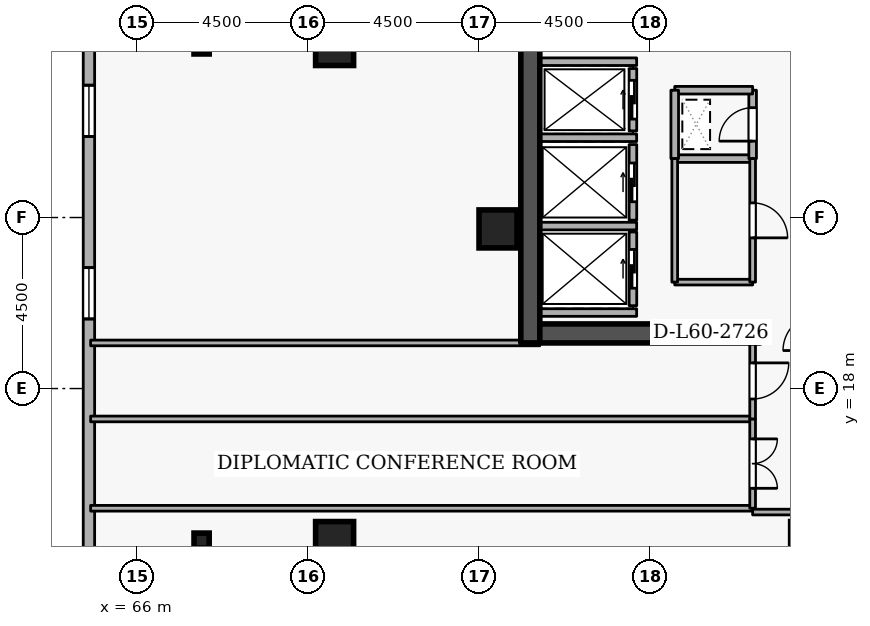
"""IFC4 building model, lengths in metres.
Left out: names, types, materials, properties, quantities, classifications, styles, units other than length and angle.
Written with IfcOpenShell. Run it as: python <this file> out.ifc"""

import sys

from ifc_helpers import new_model, si_unit, direction, frame, frame_2d, origin, origin_2d, place, context, subcontext, project, spatial, rectangle, i_section, extrude, element, fill, save


model = new_model("IFC4")
c1 = context("Model", 3, precision=1e-05, world=origin(), true_north=direction((0.0, 1.0)))
c2 = subcontext(c1, "Body", "Model", "MODEL_VIEW")
j1 = project(units=[si_unit("LENGTHUNIT", "METRE"), si_unit("PLANEANGLEUNIT", "RADIAN")], contexts=[c1])
p1 = place(None, origin())
s1 = spatial("IfcSite", under=j1, at=p1, CompositionType="ELEMENT")
p2 = place(p1, origin())
s2 = spatial("IfcBuilding", under=s1, at=p2, CompositionType="ELEMENT")
p3 = place(p2, frame((0.0, 0.0, 225.9)))
s3 = spatial("IfcBuildingStorey", under=s2, at=p3, CompositionType="ELEMENT", Elevation=225.9)
p4 = place(p3, frame((76.35, 19.2, 0.0), z_axis=(0.0, 0.0, 1.0), x_axis=(0.0, 1.0, 0.0)))
e1 = element("IfcWall", 1, at=p4, inside=s3, PredefinedType="SHEAR", context=c2, shape_type="SweptSolid", body=[
    extrude(rectangle(XDim=15.6, YDim=0.5, at=frame_2d((7.8, 0.0))), origin(), (0.0, 0.0, 1.0), 3.6),
])
p5 = place(p3, frame((76.6, 19.45, 0.0), z_axis=(0.0, 0.0, 1.0), x_axis=(1.0, 0.0, 0.0)))
e2 = element("IfcWall", 2, at=p5, inside=s3, PredefinedType="SHEAR", context=c2, shape_type="SweptSolid", body=[
    extrude(rectangle(XDim=5.8, YDim=0.5, at=frame_2d((2.9, 0.0))), origin(), (0.0, 0.0, 1.0), 3.6),
])
for number, where, z_axis, x_axis in (
    (3, (71.2, 14.0, 0.0), (0.0, 0.0, 1.0), (1.0, 0.0, 0.0)),
    (4, (71.2, 27.0, 0.0), (0.0, 0.0, 1.0), (1.0, 0.0, 0.0)),
    (5, (75.5, 22.2, 0.0), (0.0, 0.0, 1.0), (1.0, 0.0, 0.0)),
):
    element("IfcColumn", number, at=place(p3, frame(where, z_axis=z_axis, x_axis=x_axis)), inside=s3, PredefinedType="COLUMN", context=c2, shape_type="SweptSolid", body=[
        extrude(rectangle(XDim=1.0, YDim=1.0, at=origin_2d()), origin(), (0.0, 0.0, 1.0), 3.6),
    ])
for number, where, z_axis, x_axis in (
    (6, (67.7, 14.0, 0.0), (0.0, 0.0, 1.0), (1.0, 0.0, 0.0)),
    (7, (67.7, 27.0, 0.0), (0.0, 0.0, 1.0), (1.0, 0.0, 0.0)),
):
    element("IfcColumn", number, at=place(p3, frame(where, z_axis=z_axis, x_axis=x_axis)), inside=s3, PredefinedType="COLUMN", context=c2, shape_type="SweptSolid", body=[
        extrude(i_section(OverallWidth=0.399, OverallDepth=0.394, WebThickness=0.023, FlangeThickness=0.037, FilletRadius=0.015, at=origin_2d()), origin(), (0.0, 0.0, 1.0), 3.6),
    ])
p6 = place(p3, frame((64.735, 42.181, 0.0), z_axis=(0.0, 0.0, 1.0), x_axis=(0.0, -1.0, 0.0)))
e8 = element("IfcWall", 8, at=p6, inside=s3, PredefinedType="STANDARD", context=c2, shape_type="SweptSolid", body=[
    extrude(rectangle(XDim=36.363, YDim=0.3, at=frame_2d((18.181, 0.0))), origin(), (0.0, 0.0, 1.0), 2.22),
])
p7 = place(p6, frame((1.8, 0.0, 0.72)))
e9 = element("IfcOpeningElement", 9, at=p7, cuts=e8, PredefinedType="OPENING", context=c2, shape_type="SweptSolid", body=[
    extrude(rectangle(XDim=1.35, YDim=1.05, at=frame_2d((0.675, 0.525))), frame((0.0, 0.16, 0.0), z_axis=(0.0, -1.0, 0.0), x_axis=(1.0, 0.0, 0.0)), (0.0, 0.0, 1.0), 0.32),
])
p8 = place(p6, frame((6.6, 0.0, 0.72)))
e10 = element("IfcOpeningElement", 10, at=p8, cuts=e8, PredefinedType="OPENING", context=c2, shape_type="SweptSolid", body=[
    extrude(rectangle(XDim=1.35, YDim=1.05, at=frame_2d((0.675, 0.525))), frame((0.0, 0.16, 0.0), z_axis=(0.0, -1.0, 0.0), x_axis=(1.0, 0.0, 0.0)), (0.0, 0.0, 1.0), 0.32),
])
p9 = place(p6, frame((11.4, 0.0, 0.72)))
e11 = element("IfcOpeningElement", 11, at=p9, cuts=e8, PredefinedType="OPENING", context=c2, shape_type="SweptSolid", body=[
    extrude(rectangle(XDim=1.35, YDim=1.05, at=frame_2d((0.675, 0.525))), frame((0.0, 0.16, 0.0), z_axis=(0.0, -1.0, 0.0), x_axis=(1.0, 0.0, 0.0)), (0.0, 0.0, 1.0), 0.32),
])
p10 = place(p6, frame((16.2, 0.0, 0.72)))
e12 = element("IfcOpeningElement", 12, at=p10, cuts=e8, PredefinedType="OPENING", context=c2, shape_type="SweptSolid", body=[
    extrude(rectangle(XDim=1.35, YDim=1.05, at=frame_2d((0.675, 0.525))), frame((0.0, 0.16, 0.0), z_axis=(0.0, -1.0, 0.0), x_axis=(1.0, 0.0, 0.0)), (0.0, 0.0, 1.0), 0.32),
])
p11 = place(p6, frame((21.0, 0.0, 0.72)))
e13 = element("IfcOpeningElement", 13, at=p11, cuts=e8, PredefinedType="OPENING", context=c2, shape_type="SweptSolid", body=[
    extrude(rectangle(XDim=1.35, YDim=1.05, at=frame_2d((0.675, 0.525))), frame((0.0, 0.16, 0.0), z_axis=(0.0, -1.0, 0.0), x_axis=(1.0, 0.0, 0.0)), (0.0, 0.0, 1.0), 0.32),
])
p12 = place(p6, frame((30.6, 0.0, 0.72)))
e14 = element("IfcOpeningElement", 14, at=p12, cuts=e8, PredefinedType="OPENING", context=c2, shape_type="SweptSolid", body=[
    extrude(rectangle(XDim=1.35, YDim=1.05, at=frame_2d((0.675, 0.525))), frame((0.0, 0.16, 0.0), z_axis=(0.0, -1.0, 0.0), x_axis=(1.0, 0.0, 0.0)), (0.0, 0.0, 1.0), 0.32),
])
p13 = place(p3, frame((79.05, 24.78, 0.0), z_axis=(0.0, 0.0, 1.0), x_axis=(0.0, 1.0, 0.0)))
e15 = element("IfcWall", 15, at=p13, inside=s3, PredefinedType="STANDARD", context=c2, shape_type="SweptSolid", body=[
    extrude(rectangle(XDim=1.64, YDim=0.2, at=frame_2d((0.82, 0.0))), origin(), (0.0, 0.0, 1.0), 3.3),
])
p14 = place(p13, frame((0.31, 0.0, 0.0)))
e16 = element("IfcOpeningElement", 16, at=p14, cuts=e15, PredefinedType="OPENING", context=c2, shape_type="SweptSolid", body=[
    extrude(rectangle(XDim=1.02, YDim=2.06, at=frame_2d((0.51, 1.03))), frame((0.0, 0.11, 0.0), z_axis=(0.0, -1.0, 0.0), x_axis=(1.0, 0.0, 0.0)), (0.0, 0.0, 1.0), 0.22),
])
p15 = place(p3, frame((79.05, 22.43, 0.0), z_axis=(0.0, 0.0, 1.0), x_axis=(0.0, 1.0, 0.0)))
e17 = element("IfcWall", 17, at=p15, inside=s3, PredefinedType="STANDARD", context=c2, shape_type="SweptSolid", body=[
    extrude(rectangle(XDim=1.99, YDim=0.2, at=frame_2d((0.995, 0.0))), origin(), (0.0, 0.0, 1.0), 3.3),
])
p16 = place(p15, frame((0.485, 0.0, 0.0)))
e18 = element("IfcOpeningElement", 18, at=p16, cuts=e17, PredefinedType="OPENING", context=c2, shape_type="SweptSolid", body=[
    extrude(rectangle(XDim=1.02, YDim=2.06, at=frame_2d((0.51, 1.03))), frame((0.0, 0.11, 0.0), z_axis=(0.0, -1.0, 0.0), x_axis=(1.0, 0.0, 0.0)), (0.0, 0.0, 1.0), 0.22),
])
p17 = place(p3, frame((79.05, 20.18, 0.0), z_axis=(0.0, 0.0, 1.0), x_axis=(0.0, 1.0, 0.0)))
e19 = element("IfcWall", 19, at=p17, inside=s3, PredefinedType="STANDARD", context=c2, shape_type="SweptSolid", body=[
    extrude(rectangle(XDim=1.94, YDim=0.2, at=frame_2d((0.97, 0.0))), origin(), (0.0, 0.0, 1.0), 3.3),
])
p18 = place(p17, frame((0.46, 0.0, 0.0)))
e20 = element("IfcOpeningElement", 20, at=p18, cuts=e19, PredefinedType="OPENING", context=c2, shape_type="SweptSolid", body=[
    extrude(rectangle(XDim=1.02, YDim=2.06, at=frame_2d((0.51, 1.03))), frame((0.0, 0.11, 0.0), z_axis=(0.0, -1.0, 0.0), x_axis=(1.0, 0.0, 0.0)), (0.0, 0.0, 1.0), 0.22),
])
for number, where, z_axis, x_axis in (
    (21, (76.612, 26.6, 0.0), (0.0, 0.0, 1.0), (1.0, 0.0, 0.0)),
    (22, (76.612, 24.6, 0.0), (0.0, 0.0, 1.0), (1.0, 0.0, 0.0)),
    (23, (76.612, 22.275, 0.0), (0.0, 0.0, 1.0), (1.0, 0.0, 0.0)),
    (24, (76.612, 20.0, 0.0), (0.0, 0.0, 1.0), (1.0, 0.0, 0.0)),
):
    element("IfcWall", number, at=place(p3, frame(where, z_axis=z_axis, x_axis=x_axis)), inside=s3, PredefinedType="STANDARD", context=c2, shape_type="SweptSolid", body=[
        extrude(rectangle(XDim=2.536, YDim=0.2, at=frame_2d((1.268, 0.0))), origin(), (0.0, 0.0, 1.0), 3.3),
    ])
p19 = place(p3, frame((80.15, 24.05, 0.0), z_axis=(0.0, 0.0, 1.0), x_axis=(1.0, 0.0, 0.0)))
e25 = element("IfcWall", 25, at=p19, inside=s3, PredefinedType="STANDARD", context=c2, shape_type="SweptSolid", body=[
    extrude(rectangle(XDim=2.05, YDim=0.2, at=frame_2d((1.025, 0.0))), origin(), (0.0, 0.0, 1.0), 3.3),
])
p20 = place(p3, frame((82.2, 24.05, 0.0), z_axis=(0.0, 0.0, 1.0), x_axis=(0.0, 1.0, 0.0)))
e26 = element("IfcWall", 26, at=p20, inside=s3, PredefinedType="STANDARD", context=c2, shape_type="SweptSolid", body=[
    extrude(rectangle(XDim=1.8, YDim=0.2, at=frame_2d((0.9, 0.0))), origin(), (0.0, 0.0, 1.0), 3.3),
])
p21 = place(p20, frame((0.46, 0.0, 0.0)))
e27 = element("IfcOpeningElement", 27, at=p21, cuts=e26, PredefinedType="OPENING", context=c2, shape_type="SweptSolid", body=[
    extrude(rectangle(XDim=0.88, YDim=2.04, at=frame_2d((0.44, 1.02))), frame((0.0, 0.11, 0.0), z_axis=(0.0, -1.0, 0.0), x_axis=(1.0, 0.0, 0.0)), (0.0, 0.0, 1.0), 0.22),
])
p22 = place(p3, frame((82.2, 25.85, 0.0), z_axis=(0.0, 0.0, 1.0), x_axis=(-1.0, 0.0, 0.0)))
e28 = element("IfcWall", 28, at=p22, inside=s3, PredefinedType="STANDARD", context=c2, shape_type="SweptSolid", body=[
    extrude(rectangle(XDim=2.05, YDim=0.2, at=frame_2d((1.025, 0.0))), origin(), (0.0, 0.0, 1.0), 3.3),
])
p23 = place(p3, frame((80.15, 25.85, 0.0), z_axis=(0.0, 0.0, 1.0), x_axis=(0.0, -1.0, 0.0)))
e29 = element("IfcWall", 29, at=p23, inside=s3, PredefinedType="STANDARD", context=c2, shape_type="SweptSolid", body=[
    extrude(rectangle(XDim=1.8, YDim=0.2, at=frame_2d((0.9, 0.0))), origin(), (0.0, 0.0, 1.0), 3.3),
])
p24 = place(p3, frame((82.2, 20.8, 0.0), z_axis=(0.0, 0.0, 1.0), x_axis=(-1.0, 0.0, 0.0)))
e30 = element("IfcWall", 30, at=p24, inside=s3, PredefinedType="PARTITIONING", context=c2, shape_type="SweptSolid", body=[
    extrude(rectangle(XDim=2.05, YDim=0.15, at=frame_2d((1.025, 0.0))), origin(), (0.0, 0.0, 1.0), 3.3),
])
p25 = place(p3, frame((80.15, 20.8, 0.0), z_axis=(0.0, 0.0, 1.0), x_axis=(0.0, 1.0, 0.0)))
e31 = element("IfcWall", 31, at=p25, inside=s3, PredefinedType="PARTITIONING", context=c2, shape_type="SweptSolid", body=[
    extrude(rectangle(XDim=3.25, YDim=0.15, at=frame_2d((1.625, 0.0))), origin(), (0.0, 0.0, 1.0), 3.3),
])
p26 = place(p3, frame((82.2, 24.05, 0.0), z_axis=(0.0, 0.0, 1.0), x_axis=(0.0, -1.0, 0.0)))
e32 = element("IfcWall", 32, at=p26, inside=s3, PredefinedType="PARTITIONING", context=c2, shape_type="SweptSolid", body=[
    extrude(rectangle(XDim=3.25, YDim=0.15, at=frame_2d((1.625, 0.0))), origin(), (0.0, 0.0, 1.0), 3.3),
])
p27 = place(p26, frame((1.165, 0.0, 0.0)))
e33 = element("IfcOpeningElement", 33, at=p27, cuts=e32, PredefinedType="OPENING", context=c2, shape_type="SweptSolid", body=[
    extrude(rectangle(XDim=0.92, YDim=2.08, at=frame_2d((0.46, 1.04))), frame((0.0, 0.085, 0.0), z_axis=(0.0, -1.0, 0.0), x_axis=(1.0, 0.0, 0.0)), (0.0, 0.0, 1.0), 0.17),
])
for number, where, z_axis, x_axis in (
    (34, (82.2, 14.85, 0.0), (0.0, 0.0, 1.0), (-1.0, 0.0, 0.0)),
    (35, (64.78, 17.2, 0.0), (0.0, 0.0, 1.0), (1.0, 0.0, 0.0)),
):
    element("IfcWall", number, at=place(p3, frame(where, z_axis=z_axis, x_axis=x_axis)), inside=s3, PredefinedType="PARTITIONING", context=c2, shape_type="SweptSolid", body=[
        extrude(rectangle(XDim=17.42, YDim=0.15, at=frame_2d((8.71, 0.0))), origin(), (0.0, 0.0, 1.0), 3.3),
    ])
p28 = place(p3, frame((82.2, 17.2, 0.0), z_axis=(0.0, 0.0, 1.0), x_axis=(0.0, -1.0, 0.0)))
e36 = element("IfcWall", 36, at=p28, inside=s3, PredefinedType="PARTITIONING", context=c2, shape_type="SweptSolid", body=[
    extrude(rectangle(XDim=2.35, YDim=0.15, at=frame_2d((1.175, 0.0))), origin(), (0.0, 0.0, 1.0), 3.3),
])
p29 = place(p28, frame((0.525, 0.0, 0.0)))
e37 = element("IfcOpeningElement", 37, at=p29, cuts=e36, PredefinedType="OPENING", context=c2, shape_type="SweptSolid", body=[
    extrude(rectangle(XDim=1.3, YDim=2.12, at=frame_2d((0.65, 1.06))), frame((0.0, 0.085, 0.0), z_axis=(0.0, -1.0, 0.0), x_axis=(1.0, 0.0, 0.0)), (0.0, 0.0, 1.0), 0.17),
])
p30 = place(p3, frame((64.78, 19.2, 0.0), z_axis=(0.0, 0.0, 1.0), x_axis=(1.0, 0.0, 0.0)))
e38 = element("IfcWall", 38, at=p30, inside=s3, PredefinedType="PARTITIONING", context=c2, shape_type="SweptSolid", body=[
    extrude(rectangle(XDim=11.82, YDim=0.15, at=frame_2d((5.91, 0.0))), origin(), (0.0, 0.0, 1.0), 2.505),
])
p31 = place(p3, frame((82.2, 19.2, 0.0), z_axis=(0.0, 0.0, 1.0), x_axis=(0.0, -1.0, 0.0)))
e39 = element("IfcWall", 39, at=p31, inside=s3, PredefinedType="PARTITIONING", context=c2, shape_type="SweptSolid", body=[
    extrude(rectangle(XDim=2.0, YDim=0.15, at=frame_2d((1.0, 0.0))), origin(), (0.0, 0.0, 1.0), 3.3),
])
p32 = place(p31, frame((0.525, 0.0, 0.0)))
e40 = element("IfcOpeningElement", 40, at=p32, cuts=e39, PredefinedType="OPENING", context=c2, shape_type="SweptSolid", body=[
    extrude(rectangle(XDim=0.95, YDim=2.1, at=frame_2d((0.475, 1.05))), frame((0.0, 0.085, 0.0), z_axis=(0.0, -1.0, 0.0), x_axis=(1.0, 0.0, 0.0)), (0.0, 0.0, 1.0), 0.17),
])
p33 = place(p3, frame((82.2, 14.75, 0.0), z_axis=(0.0, 0.0, 1.0), x_axis=(1.0, 0.0, 0.0)))
e41 = element("IfcWall", 41, at=p33, inside=s3, PredefinedType="PARTITIONING", context=c2, shape_type="SweptSolid", body=[
    extrude(rectangle(XDim=1.75, YDim=0.15, at=frame_2d((0.875, 0.0))), origin(), (0.0, 0.0, 1.0), 3.3),
])
p34 = place(p10, origin())
e42 = element("IfcWindow", 42, at=p34, inside=s3, PartitioningType="SINGLE_PANEL", PredefinedType="WINDOW", context=c2, shape_type="SweptSolid", body=[
    extrude(rectangle(XDim=1.35, YDim=1.05, at=frame_2d((0.675, 0.525))), frame((0.0, 0.03, 0.0), z_axis=(0.0, -1.0, 0.0), x_axis=(1.0, 0.0, 0.0)), (0.0, 0.0, 1.0), 0.06),
])
fill(e12, e42)
p35 = place(p11, origin())
e43 = element("IfcWindow", 43, at=p35, inside=s3, PartitioningType="SINGLE_PANEL", PredefinedType="WINDOW", context=c2, shape_type="SweptSolid", body=[
    extrude(rectangle(XDim=1.35, YDim=1.05, at=frame_2d((0.675, 0.525))), frame((0.0, 0.03, 0.0), z_axis=(0.0, -1.0, 0.0), x_axis=(1.0, 0.0, 0.0)), (0.0, 0.0, 1.0), 0.06),
])
fill(e13, e43)
p36 = place(p14, origin())
e44 = element("IfcDoor", 44, at=p36, inside=s3, OperationType="SLIDING_TO_LEFT", PredefinedType="DOOR", context=c2, shape_type="SweptSolid", body=[
    extrude(rectangle(XDim=1.02, YDim=2.06, at=frame_2d((0.51, 1.03))), frame((0.0, 0.025, 0.0), z_axis=(0.0, -1.0, 0.0), x_axis=(1.0, 0.0, 0.0)), (0.0, 0.0, 1.0), 0.05),
])
fill(e16, e44)
p37 = place(p16, origin())
e45 = element("IfcDoor", 45, at=p37, inside=s3, OperationType="SLIDING_TO_LEFT", PredefinedType="DOOR", context=c2, shape_type="SweptSolid", body=[
    extrude(rectangle(XDim=1.02, YDim=2.06, at=frame_2d((0.51, 1.03))), frame((0.0, 0.025, 0.0), z_axis=(0.0, -1.0, 0.0), x_axis=(1.0, 0.0, 0.0)), (0.0, 0.0, 1.0), 0.05),
])
fill(e18, e45)
p38 = place(p18, origin())
e46 = element("IfcDoor", 46, at=p38, inside=s3, OperationType="SLIDING_TO_LEFT", PredefinedType="DOOR", context=c2, shape_type="SweptSolid", body=[
    extrude(rectangle(XDim=1.02, YDim=2.06, at=frame_2d((0.51, 1.03))), frame((0.0, 0.025, 0.0), z_axis=(0.0, -1.0, 0.0), x_axis=(1.0, 0.0, 0.0)), (0.0, 0.0, 1.0), 0.05),
])
fill(e20, e46)
p39 = place(p21, origin())
e47 = element("IfcDoor", 47, at=p39, inside=s3, OperationType="SINGLE_SWING_LEFT", PredefinedType="DOOR", context=c2, shape_type="SweptSolid", body=[
    extrude(rectangle(XDim=0.88, YDim=2.04, at=frame_2d((0.44, 1.02))), frame((0.0, 0.025, 0.0), z_axis=(0.0, -1.0, 0.0), x_axis=(1.0, 0.0, 0.0)), (0.0, 0.0, 1.0), 0.05),
])
fill(e27, e47)
p40 = place(p27, origin())
e48 = element("IfcDoor", 48, at=p40, inside=s3, OperationType="SINGLE_SWING_RIGHT", PredefinedType="DOOR", context=c2, shape_type="SweptSolid", body=[
    extrude(rectangle(XDim=0.92, YDim=2.08, at=frame_2d((0.46, 1.04))), frame((0.0, 0.025, 0.0), z_axis=(0.0, -1.0, 0.0), x_axis=(1.0, 0.0, 0.0)), (0.0, 0.0, 1.0), 0.05),
])
fill(e33, e48)
p41 = place(p29, origin())
e49 = element("IfcDoor", 49, at=p41, inside=s3, OperationType="DOUBLE_DOOR_SINGLE_SWING", PredefinedType="DOOR", context=c2, shape_type="SweptSolid", body=[
    extrude(rectangle(XDim=1.3, YDim=2.12, at=frame_2d((0.65, 1.06))), frame((0.0, 0.025, 0.0), z_axis=(0.0, -1.0, 0.0), x_axis=(1.0, 0.0, 0.0)), (0.0, 0.0, 1.0), 0.05),
])
fill(e37, e49)
p42 = place(p32, origin())
e50 = element("IfcDoor", 50, at=p42, inside=s3, OperationType="SINGLE_SWING_LEFT", PredefinedType="DOOR", context=c2, shape_type="SweptSolid", body=[
    extrude(rectangle(XDim=0.95, YDim=2.1, at=frame_2d((0.475, 1.05))), frame((0.0, 0.025, 0.0), z_axis=(0.0, -1.0, 0.0), x_axis=(1.0, 0.0, 0.0)), (0.0, 0.0, 1.0), 0.05),
])
fill(e40, e50)
save(model, sys.argv[1])
